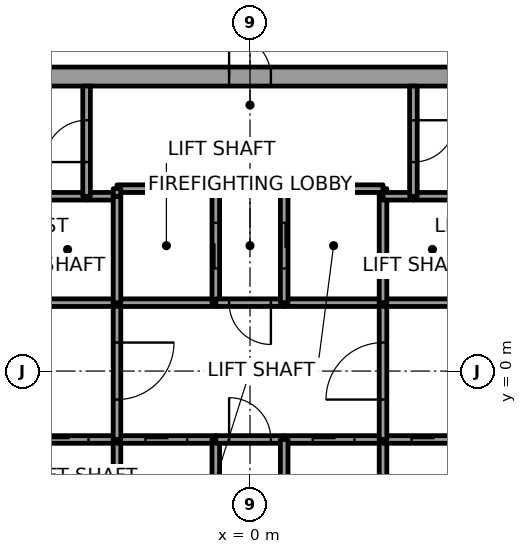
"""IFC4 building model, lengths in metres.
Left out: names, types, materials, properties, quantities, classifications, styles, units other than length and angle.
Written with IfcOpenShell. Run it as: python <this file> out.ifc"""

import sys

from ifc_helpers import new_model, si_unit, direction, frame, frame_2d, origin, place, context, subcontext, project, spatial, rectangle, extrude, element, fill, save


model = new_model("IFC4")
c1 = context("Model", 3, precision=1e-05, world=origin(), true_north=direction((0.0, 1.0)))
c2 = subcontext(c1, "Body", "Model", "MODEL_VIEW")
j1 = project(units=[si_unit("LENGTHUNIT", "METRE"), si_unit("PLANEANGLEUNIT", "RADIAN")], contexts=[c1])
p1 = place(None, origin())
s1 = spatial("IfcSite", under=j1, at=p1, CompositionType="ELEMENT")
p2 = place(p1, origin())
s2 = spatial("IfcBuilding", under=s1, at=p2, CompositionType="ELEMENT")
p3 = place(p2, frame((0.0, 0.0, 205.8)))
s3 = spatial("IfcBuildingStorey", under=s2, at=p3, CompositionType="ELEMENT", Elevation=205.8)
p4 = place(p3, frame((-11.0, 7.75, 0.0), z_axis=(0.0, 0.0, 1.0), x_axis=(1.0, 0.0, 0.0)))
e1 = element("IfcWall", 1, at=p4, inside=s3, PredefinedType="SHEAR", context=c2, shape_type="SweptSolid", body=[
    extrude(rectangle(XDim=22.0, YDim=0.5, at=frame_2d((11.0, 0.0))), origin(), (0.0, 0.0, 1.0), 4.0),
])
p5 = place(p4, frame((10.45, 0.0, 0.0)))
e2 = element("IfcOpeningElement", 2, at=p5, cuts=e1, PredefinedType="OPENING", context=c2, shape_type="SweptSolid", body=[
    extrude(rectangle(XDim=1.1, YDim=2.1, at=frame_2d((0.55, 1.05))), frame((0.0, 0.25, 0.0), z_axis=(0.0, -1.0, 0.0), x_axis=(1.0, 0.0, 0.0)), (0.0, 0.0, 1.0), 0.5),
])
p6 = place(p3, frame((-6.1, -1.8, 0.0), z_axis=(0.0, 0.0, 1.0), x_axis=(1.0, 0.0, 0.0)))
e3 = element("IfcWall", 3, at=p6, inside=s3, PredefinedType="SOLIDWALL", context=c2, shape_type="SweptSolid", body=[
    extrude(rectangle(XDim=2.6, YDim=0.2, at=frame_2d((1.3, 0.0))), origin(), (0.0, 0.0, 1.0), 3.85),
])
p7 = place(p6, frame((0.75, 0.0, 0.0)))
e4 = element("IfcOpeningElement", 4, at=p7, cuts=e3, PredefinedType="OPENING", context=c2, shape_type="SweptSolid", body=[
    extrude(rectangle(XDim=1.1, YDim=2.1, at=frame_2d((0.55, 1.05))), frame((0.0, 0.1, 0.0), z_axis=(0.0, -1.0, 0.0), x_axis=(1.0, 0.0, 0.0)), (0.0, 0.0, 1.0), 0.2),
])
p8 = place(p3, frame((-3.5, 1.8, 0.0), z_axis=(0.0, 0.0, 1.0), x_axis=(-1.0, 0.0, 0.0)))
e5 = element("IfcWall", 5, at=p8, inside=s3, PredefinedType="SOLIDWALL", context=c2, shape_type="SweptSolid", body=[
    extrude(rectangle(XDim=2.6, YDim=0.2, at=frame_2d((1.3, 0.0))), origin(), (0.0, 0.0, 1.0), 3.85),
])
p9 = place(p3, frame((-4.3, 4.6, 0.0), z_axis=(0.0, 0.0, 1.0), x_axis=(-1.0, 0.0, 0.0)))
e6 = element("IfcWall", 6, at=p9, inside=s3, PredefinedType="SOLIDWALL", context=c2, shape_type="SweptSolid", body=[
    extrude(rectangle(XDim=1.8, YDim=0.2, at=frame_2d((0.9, 0.0))), origin(), (0.0, 0.0, 1.0), 3.85),
])
p10 = place(p3, frame((-3.5, 4.6, 0.0), z_axis=(0.0, 0.0, 1.0), x_axis=(-1.0, 0.0, 0.0)))
e7 = element("IfcWall", 7, at=p10, inside=s3, PredefinedType="SOLIDWALL", context=c2, shape_type="SweptSolid", body=[
    extrude(rectangle(XDim=0.8, YDim=0.2, at=frame_2d((0.4, 0.0))), origin(), (0.0, 0.0, 1.0), 3.85),
])
p11 = place(p3, frame((-4.3, 4.6, 0.0), z_axis=(0.0, 0.0, 1.0), x_axis=(0.0, 1.0, 0.0)))
e8 = element("IfcWall", 8, at=p11, inside=s3, PredefinedType="SOLIDWALL", context=c2, shape_type="SweptSolid", body=[
    extrude(rectangle(XDim=2.9, YDim=0.2, at=frame_2d((1.45, 0.0))), origin(), (0.0, 0.0, 1.0), 3.85),
])
p12 = place(p11, frame((0.9, 0.0, 0.0)))
e9 = element("IfcOpeningElement", 9, at=p12, cuts=e8, PredefinedType="OPENING", context=c2, shape_type="SweptSolid", body=[
    extrude(rectangle(XDim=1.1, YDim=2.1, at=frame_2d((0.55, 1.05))), frame((0.0, 0.1, 0.0), z_axis=(0.0, -1.0, 0.0), x_axis=(1.0, 0.0, 0.0)), (0.0, 0.0, 1.0), 0.2),
])
p13 = place(p3, frame((-3.5, -4.6, 0.0), z_axis=(0.0, 0.0, 1.0), x_axis=(0.0, 1.0, 0.0)))
e10 = element("IfcWall", 10, at=p13, inside=s3, PredefinedType="SOLIDWALL", context=c2, shape_type="SweptSolid", body=[
    extrude(rectangle(XDim=2.8, YDim=0.2, at=frame_2d((1.4, 0.0))), origin(), (0.0, 0.0, 1.0), 3.85),
])
p14 = place(p3, frame((-3.5, -1.8, 0.0), z_axis=(0.0, 0.0, 1.0), x_axis=(1.0, 0.0, 0.0)))
e11 = element("IfcWall", 11, at=p14, inside=s3, PredefinedType="SOLIDWALL", context=c2, shape_type="SweptSolid", body=[
    extrude(rectangle(XDim=2.6, YDim=0.2, at=frame_2d((1.3, 0.0))), origin(), (0.0, 0.0, 1.0), 3.85),
])
p15 = place(p14, frame((0.75, 0.0, 0.0)))
e12 = element("IfcOpeningElement", 12, at=p15, cuts=e11, PredefinedType="OPENING", context=c2, shape_type="SweptSolid", body=[
    extrude(rectangle(XDim=1.1, YDim=2.1, at=frame_2d((0.55, 1.05))), frame((0.0, 0.1, 0.0), z_axis=(0.0, -1.0, 0.0), x_axis=(1.0, 0.0, 0.0)), (0.0, 0.0, 1.0), 0.2),
])
p16 = place(p3, frame((-3.5, 1.8, 0.0), z_axis=(0.0, 0.0, 1.0), x_axis=(0.0, -1.0, 0.0)))
e13 = element("IfcWall", 13, at=p16, inside=s3, PredefinedType="SOLIDWALL", context=c2, shape_type="SweptSolid", body=[
    extrude(rectangle(XDim=3.6, YDim=0.2, at=frame_2d((1.8, 0.0))), origin(), (0.0, 0.0, 1.0), 3.85),
])
p17 = place(p16, frame((1.05, 0.0, 0.0)))
e14 = element("IfcOpeningElement", 14, at=p17, cuts=e13, PredefinedType="OPENING", context=c2, shape_type="SweptSolid", body=[
    extrude(rectangle(XDim=1.5, YDim=2.1, at=frame_2d((0.75, 1.05))), frame((0.0, 0.1, 0.0), z_axis=(0.0, -1.0, 0.0), x_axis=(1.0, 0.0, 0.0)), (0.0, 0.0, 1.0), 0.2),
])
p18 = place(p3, frame((-0.9, 1.8, 0.0), z_axis=(0.0, 0.0, 1.0), x_axis=(-1.0, 0.0, 0.0)))
e15 = element("IfcWall", 15, at=p18, inside=s3, PredefinedType="SOLIDWALL", context=c2, shape_type="SweptSolid", body=[
    extrude(rectangle(XDim=2.6, YDim=0.2, at=frame_2d((1.3, 0.0))), origin(), (0.0, 0.0, 1.0), 3.85),
])
p19 = place(p3, frame((-3.5, 4.6, 0.0), z_axis=(0.0, 0.0, 1.0), x_axis=(0.0, -1.0, 0.0)))
e16 = element("IfcWall", 16, at=p19, inside=s3, PredefinedType="SOLIDWALL", context=c2, shape_type="SweptSolid", body=[
    extrude(rectangle(XDim=2.8, YDim=0.2, at=frame_2d((1.4, 0.0))), origin(), (0.0, 0.0, 1.0), 3.85),
])
p20 = place(p3, frame((-0.9, 1.8, 0.0), z_axis=(0.0, 0.0, 1.0), x_axis=(0.0, 1.0, 0.0)))
e17 = element("IfcWall", 17, at=p20, inside=s3, PredefinedType="SOLIDWALL", context=c2, shape_type="SweptSolid", body=[
    extrude(rectangle(XDim=3.0, YDim=0.2, at=frame_2d((1.5, 0.0))), origin(), (0.0, 0.0, 1.0), 3.85),
])
p21 = place(p20, frame((0.9, 0.0, 0.0)))
e18 = element("IfcOpeningElement", 18, at=p21, cuts=e17, PredefinedType="OPENING", context=c2, shape_type="SweptSolid", body=[
    extrude(rectangle(XDim=1.2, YDim=2.1, at=frame_2d((0.6, 1.05))), frame((0.0, 0.1, 0.0), z_axis=(0.0, -1.0, 0.0), x_axis=(1.0, 0.0, 0.0)), (0.0, 0.0, 1.0), 0.2),
])
p22 = place(p3, frame((-0.9, 4.8, 0.0), z_axis=(0.0, 0.0, 1.0), x_axis=(-1.0, 0.0, 0.0)))
e19 = element("IfcWall", 19, at=p22, inside=s3, PredefinedType="SOLIDWALL", context=c2, shape_type="SweptSolid", body=[
    extrude(rectangle(XDim=2.6, YDim=0.2, at=frame_2d((1.3, 0.0))), origin(), (0.0, 0.0, 1.0), 3.85),
])
p23 = place(p3, frame((-3.5, 4.8, 0.0), z_axis=(0.0, 0.0, 1.0), x_axis=(0.0, -1.0, 0.0)))
e20 = element("IfcWall", 20, at=p23, inside=s3, PredefinedType="SOLIDWALL", context=c2, shape_type="SweptSolid", body=[
    extrude(rectangle(XDim=0.2, YDim=0.2, at=frame_2d((0.1, 0.0))), origin(), (0.0, 0.0, 1.0), 3.85),
])
p24 = place(p3, frame((-0.9, -4.6, 0.0), z_axis=(0.0, 0.0, 1.0), x_axis=(0.0, 1.0, 0.0)))
e21 = element("IfcWall", 21, at=p24, inside=s3, PredefinedType="SOLIDWALL", context=c2, shape_type="SweptSolid", body=[
    extrude(rectangle(XDim=2.8, YDim=0.2, at=frame_2d((1.4, 0.0))), origin(), (0.0, 0.0, 1.0), 3.85),
])
p25 = place(p3, frame((-0.9, -1.8, 0.0), z_axis=(0.0, 0.0, 1.0), x_axis=(1.0, 0.0, 0.0)))
e22 = element("IfcWall", 22, at=p25, inside=s3, PredefinedType="SOLIDWALL", context=c2, shape_type="SweptSolid", body=[
    extrude(rectangle(XDim=1.8, YDim=0.2, at=frame_2d((0.9, 0.0))), origin(), (0.0, 0.0, 1.0), 3.85),
])
p26 = place(p25, frame((0.35, 0.0, 0.0)))
e23 = element("IfcOpeningElement", 23, at=p26, cuts=e22, PredefinedType="OPENING", context=c2, shape_type="SweptSolid", body=[
    extrude(rectangle(XDim=1.1, YDim=2.1, at=frame_2d((0.55, 1.05))), frame((0.0, 0.1, 0.0), z_axis=(0.0, -1.0, 0.0), x_axis=(1.0, 0.0, 0.0)), (0.0, 0.0, 1.0), 0.2),
])
p27 = place(p3, frame((0.9, 1.8, 0.0), z_axis=(0.0, 0.0, 1.0), x_axis=(-1.0, 0.0, 0.0)))
e24 = element("IfcWall", 24, at=p27, inside=s3, PredefinedType="SOLIDWALL", context=c2, shape_type="SweptSolid", body=[
    extrude(rectangle(XDim=1.8, YDim=0.2, at=frame_2d((0.9, 0.0))), origin(), (0.0, 0.0, 1.0), 3.85),
])
p28 = place(p27, frame((0.35, 0.0, 0.0)))
e25 = element("IfcOpeningElement", 25, at=p28, cuts=e24, PredefinedType="OPENING", context=c2, shape_type="SweptSolid", body=[
    extrude(rectangle(XDim=1.1, YDim=2.1, at=frame_2d((0.55, 1.05))), frame((0.0, 0.1, 0.0), z_axis=(0.0, -1.0, 0.0), x_axis=(1.0, 0.0, 0.0)), (0.0, 0.0, 1.0), 0.2),
])
p29 = place(p3, frame((0.9, -1.8, 0.0), z_axis=(0.0, 0.0, 1.0), x_axis=(1.0, 0.0, 0.0)))
e26 = element("IfcWall", 26, at=p29, inside=s3, PredefinedType="SOLIDWALL", context=c2, shape_type="SweptSolid", body=[
    extrude(rectangle(XDim=2.6, YDim=0.2, at=frame_2d((1.3, 0.0))), origin(), (0.0, 0.0, 1.0), 3.85),
])
p30 = place(p29, frame((0.75, 0.0, 0.0)))
e27 = element("IfcOpeningElement", 27, at=p30, cuts=e26, PredefinedType="OPENING", context=c2, shape_type="SweptSolid", body=[
    extrude(rectangle(XDim=1.1, YDim=2.1, at=frame_2d((0.55, 1.05))), frame((0.0, 0.1, 0.0), z_axis=(0.0, -1.0, 0.0), x_axis=(1.0, 0.0, 0.0)), (0.0, 0.0, 1.0), 0.2),
])
p31 = place(p3, frame((0.9, -1.8, 0.0), z_axis=(0.0, 0.0, 1.0), x_axis=(0.0, -1.0, 0.0)))
e28 = element("IfcWall", 28, at=p31, inside=s3, PredefinedType="SOLIDWALL", context=c2, shape_type="SweptSolid", body=[
    extrude(rectangle(XDim=2.8, YDim=0.2, at=frame_2d((1.4, 0.0))), origin(), (0.0, 0.0, 1.0), 3.85),
])
p32 = place(p3, frame((3.5, 1.8, 0.0), z_axis=(0.0, 0.0, 1.0), x_axis=(-1.0, 0.0, 0.0)))
e29 = element("IfcWall", 29, at=p32, inside=s3, PredefinedType="SOLIDWALL", context=c2, shape_type="SweptSolid", body=[
    extrude(rectangle(XDim=2.6, YDim=0.2, at=frame_2d((1.3, 0.0))), origin(), (0.0, 0.0, 1.0), 3.85),
])
p33 = place(p3, frame((3.5, 4.6, 0.0), z_axis=(0.0, 0.0, 1.0), x_axis=(0.0, 1.0, 0.0)))
e30 = element("IfcWall", 30, at=p33, inside=s3, PredefinedType="SOLIDWALL", context=c2, shape_type="SweptSolid", body=[
    extrude(rectangle(XDim=0.2, YDim=0.2, at=frame_2d((0.1, 0.0))), origin(), (0.0, 0.0, 1.0), 3.85),
])
p34 = place(p3, frame((3.5, 4.8, 0.0), z_axis=(0.0, 0.0, 1.0), x_axis=(-1.0, 0.0, 0.0)))
e31 = element("IfcWall", 31, at=p34, inside=s3, PredefinedType="SOLIDWALL", context=c2, shape_type="SweptSolid", body=[
    extrude(rectangle(XDim=2.6, YDim=0.2, at=frame_2d((1.3, 0.0))), origin(), (0.0, 0.0, 1.0), 3.85),
])
p35 = place(p3, frame((0.9, 4.8, 0.0), z_axis=(0.0, 0.0, 1.0), x_axis=(0.0, -1.0, 0.0)))
e32 = element("IfcWall", 32, at=p35, inside=s3, PredefinedType="SOLIDWALL", context=c2, shape_type="SweptSolid", body=[
    extrude(rectangle(XDim=3.0, YDim=0.2, at=frame_2d((1.5, 0.0))), origin(), (0.0, 0.0, 1.0), 3.85),
])
p36 = place(p35, frame((0.9, 0.0, 0.0)))
e33 = element("IfcOpeningElement", 33, at=p36, cuts=e32, PredefinedType="OPENING", context=c2, shape_type="SweptSolid", body=[
    extrude(rectangle(XDim=1.2, YDim=2.1, at=frame_2d((0.6, 1.05))), frame((0.0, 0.1, 0.0), z_axis=(0.0, -1.0, 0.0), x_axis=(1.0, 0.0, 0.0)), (0.0, 0.0, 1.0), 0.2),
])
p37 = place(p3, frame((3.5, -4.6, 0.0), z_axis=(0.0, 0.0, 1.0), x_axis=(0.0, 1.0, 0.0)))
e34 = element("IfcWall", 34, at=p37, inside=s3, PredefinedType="SOLIDWALL", context=c2, shape_type="SweptSolid", body=[
    extrude(rectangle(XDim=2.8, YDim=0.2, at=frame_2d((1.4, 0.0))), origin(), (0.0, 0.0, 1.0), 3.85),
])
p38 = place(p3, frame((3.5, -1.8, 0.0), z_axis=(0.0, 0.0, 1.0), x_axis=(1.0, 0.0, 0.0)))
e35 = element("IfcWall", 35, at=p38, inside=s3, PredefinedType="SOLIDWALL", context=c2, shape_type="SweptSolid", body=[
    extrude(rectangle(XDim=2.6, YDim=0.2, at=frame_2d((1.3, 0.0))), origin(), (0.0, 0.0, 1.0), 3.85),
])
p39 = place(p38, frame((0.75, 0.0, 0.0)))
e36 = element("IfcOpeningElement", 36, at=p39, cuts=e35, PredefinedType="OPENING", context=c2, shape_type="SweptSolid", body=[
    extrude(rectangle(XDim=1.1, YDim=2.1, at=frame_2d((0.55, 1.05))), frame((0.0, 0.1, 0.0), z_axis=(0.0, -1.0, 0.0), x_axis=(1.0, 0.0, 0.0)), (0.0, 0.0, 1.0), 0.2),
])
p40 = place(p3, frame((3.5, -1.8, 0.0), z_axis=(0.0, 0.0, 1.0), x_axis=(0.0, 1.0, 0.0)))
e37 = element("IfcWall", 37, at=p40, inside=s3, PredefinedType="SOLIDWALL", context=c2, shape_type="SweptSolid", body=[
    extrude(rectangle(XDim=3.6, YDim=0.2, at=frame_2d((1.8, 0.0))), origin(), (0.0, 0.0, 1.0), 3.85),
])
p41 = place(p40, frame((1.05, 0.0, 0.0)))
e38 = element("IfcOpeningElement", 38, at=p41, cuts=e37, PredefinedType="OPENING", context=c2, shape_type="SweptSolid", body=[
    extrude(rectangle(XDim=1.5, YDim=2.1, at=frame_2d((0.75, 1.05))), frame((0.0, 0.1, 0.0), z_axis=(0.0, -1.0, 0.0), x_axis=(1.0, 0.0, 0.0)), (0.0, 0.0, 1.0), 0.2),
])
p42 = place(p3, frame((6.1, 1.8, 0.0), z_axis=(0.0, 0.0, 1.0), x_axis=(-1.0, 0.0, 0.0)))
e39 = element("IfcWall", 39, at=p42, inside=s3, PredefinedType="SOLIDWALL", context=c2, shape_type="SweptSolid", body=[
    extrude(rectangle(XDim=2.6, YDim=0.2, at=frame_2d((1.3, 0.0))), origin(), (0.0, 0.0, 1.0), 3.85),
])
p43 = place(p3, frame((3.5, 1.8, 0.0), z_axis=(0.0, 0.0, 1.0), x_axis=(0.0, 1.0, 0.0)))
e40 = element("IfcWall", 40, at=p43, inside=s3, PredefinedType="SOLIDWALL", context=c2, shape_type="SweptSolid", body=[
    extrude(rectangle(XDim=2.8, YDim=0.2, at=frame_2d((1.4, 0.0))), origin(), (0.0, 0.0, 1.0), 3.85),
])
p44 = place(p3, frame((4.3, 4.6, 0.0), z_axis=(0.0, 0.0, 1.0), x_axis=(-1.0, 0.0, 0.0)))
e41 = element("IfcWall", 41, at=p44, inside=s3, PredefinedType="SOLIDWALL", context=c2, shape_type="SweptSolid", body=[
    extrude(rectangle(XDim=0.8, YDim=0.2, at=frame_2d((0.4, 0.0))), origin(), (0.0, 0.0, 1.0), 3.85),
])
p45 = place(p3, frame((6.1, 4.6, 0.0), z_axis=(0.0, 0.0, 1.0), x_axis=(-1.0, 0.0, 0.0)))
e42 = element("IfcWall", 42, at=p45, inside=s3, PredefinedType="SOLIDWALL", context=c2, shape_type="SweptSolid", body=[
    extrude(rectangle(XDim=1.8, YDim=0.2, at=frame_2d((0.9, 0.0))), origin(), (0.0, 0.0, 1.0), 3.85),
])
p46 = place(p3, frame((4.3, 7.5, 0.0), z_axis=(0.0, 0.0, 1.0), x_axis=(0.0, -1.0, 0.0)))
e43 = element("IfcWall", 43, at=p46, inside=s3, PredefinedType="SOLIDWALL", context=c2, shape_type="SweptSolid", body=[
    extrude(rectangle(XDim=2.9, YDim=0.2, at=frame_2d((1.45, 0.0))), origin(), (0.0, 0.0, 1.0), 3.85),
])
p47 = place(p46, frame((0.9, 0.0, 0.0)))
e44 = element("IfcOpeningElement", 44, at=p47, cuts=e43, PredefinedType="OPENING", context=c2, shape_type="SweptSolid", body=[
    extrude(rectangle(XDim=1.1, YDim=2.1, at=frame_2d((0.55, 1.05))), frame((0.0, 0.1, 0.0), z_axis=(0.0, -1.0, 0.0), x_axis=(1.0, 0.0, 0.0)), (0.0, 0.0, 1.0), 0.2),
])
p48 = place(p7, origin())
e45 = element("IfcDoor", 45, at=p48, inside=s3, OperationType="SLIDING_TO_RIGHT", PredefinedType="DOOR", context=c2, shape_type="SweptSolid", body=[
    extrude(rectangle(XDim=1.1, YDim=2.1, at=frame_2d((0.55, 1.05))), frame((0.0, 0.025, 0.0), z_axis=(0.0, -1.0, 0.0), x_axis=(1.0, 0.0, 0.0)), (0.0, 0.0, 1.0), 0.05),
])
fill(e4, e45)
p49 = place(p15, origin())
e46 = element("IfcDoor", 46, at=p49, inside=s3, OperationType="SLIDING_TO_RIGHT", PredefinedType="DOOR", context=c2, shape_type="SweptSolid", body=[
    extrude(rectangle(XDim=1.1, YDim=2.1, at=frame_2d((0.55, 1.05))), frame((0.0, 0.025, 0.0), z_axis=(0.0, -1.0, 0.0), x_axis=(1.0, 0.0, 0.0)), (0.0, 0.0, 1.0), 0.05),
])
fill(e12, e46)
p50 = place(p30, origin())
e47 = element("IfcDoor", 47, at=p50, inside=s3, OperationType="SLIDING_TO_LEFT", PredefinedType="DOOR", context=c2, shape_type="SweptSolid", body=[
    extrude(rectangle(XDim=1.1, YDim=2.1, at=frame_2d((0.55, 1.05))), frame((0.0, 0.025, 0.0), z_axis=(0.0, -1.0, 0.0), x_axis=(1.0, 0.0, 0.0)), (0.0, 0.0, 1.0), 0.05),
])
fill(e27, e47)
p51 = place(p39, origin())
e48 = element("IfcDoor", 48, at=p51, inside=s3, OperationType="SLIDING_TO_RIGHT", PredefinedType="DOOR", context=c2, shape_type="SweptSolid", body=[
    extrude(rectangle(XDim=1.1, YDim=2.1, at=frame_2d((0.55, 1.05))), frame((0.0, 0.025, 0.0), z_axis=(0.0, -1.0, 0.0), x_axis=(1.0, 0.0, 0.0)), (0.0, 0.0, 1.0), 0.05),
])
fill(e36, e48)
p52 = place(p21, origin())
e49 = element("IfcDoor", 49, at=p52, inside=s3, OperationType="SLIDING_TO_LEFT", PredefinedType="DOOR", context=c2, shape_type="SweptSolid", body=[
    extrude(rectangle(XDim=1.2, YDim=2.1, at=frame_2d((0.6, 1.05))), frame((0.0, 0.025, 0.0), z_axis=(0.0, -1.0, 0.0), x_axis=(1.0, 0.0, 0.0)), (0.0, 0.0, 1.0), 0.05),
])
fill(e18, e49)
p53 = place(p36, origin())
e50 = element("IfcDoor", 50, at=p53, inside=s3, OperationType="SLIDING_TO_RIGHT", PredefinedType="DOOR", context=c2, shape_type="SweptSolid", body=[
    extrude(rectangle(XDim=1.2, YDim=2.1, at=frame_2d((0.6, 1.05))), frame((0.0, 0.025, 0.0), z_axis=(0.0, -1.0, 0.0), x_axis=(1.0, 0.0, 0.0)), (0.0, 0.0, 1.0), 0.05),
])
fill(e33, e50)
p54 = place(p17, origin())
e51 = element("IfcDoor", 51, at=p54, inside=s3, OperationType="DOUBLE_DOOR_SINGLE_SWING", PredefinedType="DOOR", context=c2, shape_type="SweptSolid", body=[
    extrude(rectangle(XDim=1.5, YDim=2.1, at=frame_2d((0.75, 1.05))), frame((0.0, 0.025, 0.0), z_axis=(0.0, -1.0, 0.0), x_axis=(1.0, 0.0, 0.0)), (0.0, 0.0, 1.0), 0.05),
])
fill(e14, e51)
p55 = place(p41, origin())
e52 = element("IfcDoor", 52, at=p55, inside=s3, OperationType="DOUBLE_DOOR_SINGLE_SWING", PredefinedType="DOOR", context=c2, shape_type="SweptSolid", body=[
    extrude(rectangle(XDim=1.5, YDim=2.1, at=frame_2d((0.75, 1.05))), frame((0.0, 0.025, 0.0), z_axis=(0.0, -1.0, 0.0), x_axis=(1.0, 0.0, 0.0)), (0.0, 0.0, 1.0), 0.05),
])
fill(e38, e52)
p56 = place(p28, origin())
e53 = element("IfcDoor", 53, at=p56, inside=s3, OperationType="SINGLE_SWING_RIGHT", PredefinedType="DOOR", context=c2, shape_type="SweptSolid", body=[
    extrude(rectangle(XDim=1.1, YDim=2.1, at=frame_2d((0.55, 1.05))), frame((0.0, 0.025, 0.0), z_axis=(0.0, -1.0, 0.0), x_axis=(1.0, 0.0, 0.0)), (0.0, 0.0, 1.0), 0.05),
])
fill(e25, e53)
p57 = place(p26, origin())
e54 = element("IfcDoor", 54, at=p57, inside=s3, OperationType="SINGLE_SWING_LEFT", PredefinedType="DOOR", context=c2, shape_type="SweptSolid", body=[
    extrude(rectangle(XDim=1.1, YDim=2.1, at=frame_2d((0.55, 1.05))), frame((0.0, 0.025, 0.0), z_axis=(0.0, -1.0, 0.0), x_axis=(1.0, 0.0, 0.0)), (0.0, 0.0, 1.0), 0.05),
])
fill(e23, e54)
p58 = place(p12, origin())
e55 = element("IfcDoor", 55, at=p58, inside=s3, OperationType="SINGLE_SWING_RIGHT", PredefinedType="DOOR", context=c2, shape_type="SweptSolid", body=[
    extrude(rectangle(XDim=1.1, YDim=2.1, at=frame_2d((0.55, 1.05))), frame((0.0, 0.025, 0.0), z_axis=(0.0, -1.0, 0.0), x_axis=(1.0, 0.0, 0.0)), (0.0, 0.0, 1.0), 0.05),
])
fill(e9, e55)
p59 = place(p47, origin())
e56 = element("IfcDoor", 56, at=p59, inside=s3, OperationType="SINGLE_SWING_LEFT", PredefinedType="DOOR", context=c2, shape_type="SweptSolid", body=[
    extrude(rectangle(XDim=1.1, YDim=2.1, at=frame_2d((0.55, 1.05))), frame((0.0, 0.025, 0.0), z_axis=(0.0, -1.0, 0.0), x_axis=(1.0, 0.0, 0.0)), (0.0, 0.0, 1.0), 0.05),
])
fill(e44, e56)
p60 = place(p5, origin())
e57 = element("IfcDoor", 57, at=p60, inside=s3, OperationType="SINGLE_SWING_LEFT", PredefinedType="DOOR", context=c2, shape_type="SweptSolid", body=[
    extrude(rectangle(XDim=1.1, YDim=2.1, at=frame_2d((0.55, 1.05))), frame((0.0, 0.025, 0.0), z_axis=(0.0, -1.0, 0.0), x_axis=(1.0, 0.0, 0.0)), (0.0, 0.0, 1.0), 0.05),
])
fill(e2, e57)
save(model, sys.argv[1])
